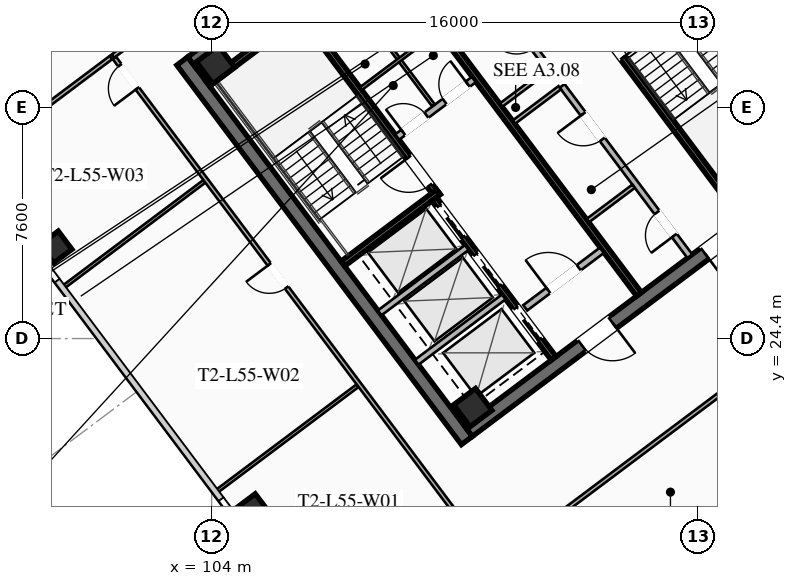
"""IFC4 building model, lengths in metres.
Left out: names, types, materials, properties, quantities, classifications, styles, units other than length and angle.
Written with IfcOpenShell. Run it as: python <this file> out.ifc"""

import sys

from ifc_helpers import new_model, si_unit, direction, frame, frame_2d, origin, origin_2d, place, context, subcontext, project, spatial, rectangle, hollow_rectangle, extrude, element, fill, save


model = new_model("IFC4")
c1 = context("Model", 3, precision=1e-05, world=origin(), true_north=direction((0.0, 1.0)))
c2 = subcontext(c1, "Body", "Model", "MODEL_VIEW")
j1 = project(units=[si_unit("LENGTHUNIT", "METRE"), si_unit("PLANEANGLEUNIT", "RADIAN")], contexts=[c1])
p1 = place(None, origin())
s1 = spatial("IfcSite", under=j1, at=p1, CompositionType="ELEMENT")
p2 = place(p1, origin())
s2 = spatial("IfcBuilding", under=s1, at=p2, CompositionType="ELEMENT")
p3 = place(p2, frame((0.0, 0.0, 204.2)))
s3 = spatial("IfcBuildingStorey", under=s2, at=p3, CompositionType="ELEMENT", Elevation=204.2)
for number, where, z_axis, x_axis in (
    (1, (112.396, 21.047, 0.0), (0.0, 0.0, 1.0), (-0.6, 0.8, 0.0)),
    (2, (115.604, 42.953, 0.0), (0.0, 0.0, 1.0), (0.6, -0.8, 0.0)),
):
    element("IfcWall", number, at=place(p3, frame(where, z_axis=z_axis, x_axis=x_axis)), inside=s3, PredefinedType="SHEAR", context=c2, shape_type="SweptSolid", body=[
        extrude(rectangle(XDim=15.6, YDim=0.45, at=frame_2d((7.8, 0.0))), origin(), (0.0, 0.0, 1.0), 3.55),
    ])
p4 = place(p3, frame((124.649, 30.518, 0.0), z_axis=(0.0, 0.0, 1.0), x_axis=(-0.8, -0.6, 0.0)))
e3 = element("IfcWall", 3, at=p4, inside=s3, PredefinedType="SHEAR", context=c2, shape_type="SweptSolid", body=[
    extrude(rectangle(XDim=15.26, YDim=0.45, at=frame_2d((7.63, 0.0))), origin(), (0.0, 0.0, 1.0), 3.55),
])
p5 = place(p4, frame((9.33, 0.0, 0.0)))
e4 = element("IfcOpeningElement", 4, at=p5, cuts=e3, PredefinedType="OPENING", context=c2, shape_type="SweptSolid", body=[
    extrude(rectangle(XDim=1.25, YDim=2.25, at=frame_2d((0.625, 1.125))), frame((0.0, 0.235, 0.0), z_axis=(0.0, -1.0, 0.0), x_axis=(1.0, 0.0, 0.0)), (0.0, 0.0, 1.0), 0.47),
])
p6 = place(p4, frame((4.28, 0.0, 0.0)))
e5 = element("IfcOpeningElement", 5, at=p6, cuts=e3, PredefinedType="OPENING", context=c2, shape_type="SweptSolid", body=[
    extrude(rectangle(XDim=1.25, YDim=2.25, at=frame_2d((0.625, 1.125))), frame((0.0, 0.235, 0.0), z_axis=(0.0, -1.0, 0.0), x_axis=(1.0, 0.0, 0.0)), (0.0, 0.0, 1.0), 0.47),
])
p7 = place(p3, frame((103.351, 33.482, 0.0), z_axis=(0.0, 0.0, 1.0), x_axis=(0.8, 0.6, 0.0)))
e6 = element("IfcWall", 6, at=p7, inside=s3, PredefinedType="SHEAR", context=c2, shape_type="SweptSolid", body=[
    extrude(rectangle(XDim=15.26, YDim=0.45, at=frame_2d((7.63, 0.0))), origin(), (0.0, 0.0, 1.0), 3.55),
])
p8 = place(p7, frame((4.68, 0.0, 0.0)))
e7 = element("IfcOpeningElement", 7, at=p8, cuts=e6, PredefinedType="OPENING", context=c2, shape_type="SweptSolid", body=[
    extrude(rectangle(XDim=1.25, YDim=2.25, at=frame_2d((0.625, 1.125))), frame((0.0, 0.235, 0.0), z_axis=(0.0, -1.0, 0.0), x_axis=(1.0, 0.0, 0.0)), (0.0, 0.0, 1.0), 0.47),
])
p9 = place(p7, frame((9.73, 0.0, 0.0)))
e8 = element("IfcOpeningElement", 8, at=p9, cuts=e6, PredefinedType="OPENING", context=c2, shape_type="SweptSolid", body=[
    extrude(rectangle(XDim=1.25, YDim=2.25, at=frame_2d((0.625, 1.125))), frame((0.0, 0.235, 0.0), z_axis=(0.0, -1.0, 0.0), x_axis=(1.0, 0.0, 0.0)), (0.0, 0.0, 1.0), 0.47),
])
for number, where, z_axis, x_axis in (
    (9, (112.59, 22.13, 0.0), (0.0, 0.0, 1.0), (0.8, 0.6, 0.0)),
    (10, (104.13, 33.41, 0.0), (0.0, 0.0, 1.0), (0.8, 0.6, 0.0)),
):
    element("IfcColumn", number, at=place(p3, frame(where, z_axis=z_axis, x_axis=x_axis)), inside=s3, PredefinedType="COLUMN", context=c2, shape_type="SweptSolid", body=[
        extrude(hollow_rectangle(XDim=0.9, YDim=0.9, WallThickness=0.04, at=origin_2d()), origin(), (0.0, 0.0, 1.0), 3.37),
    ])
for number, where, z_axis, x_axis in (
    (11, (98.88, 27.41, 0.0), (0.0, 0.0, 1.0), (0.8, 0.6, 0.0)),
    (12, (105.36, 18.77, 0.0), (0.0, 0.0, 1.0), (0.8, 0.6, 0.0)),
):
    element("IfcColumn", number, at=place(p3, frame(where, z_axis=z_axis, x_axis=x_axis)), inside=s3, PredefinedType="COLUMN", context=c2, shape_type="SweptSolid", body=[
        extrude(hollow_rectangle(XDim=0.75, YDim=0.75, WallThickness=0.032, at=origin_2d()), origin(), (0.0, 0.0, 1.0), 3.37),
    ])
p10 = place(p3, frame((111.44, 29.08, 0.0), z_axis=(0.0, 0.0, 1.0), x_axis=(-0.59999041401, 0.800007189403, 0.0)))
e13 = element("IfcWall", 13, at=p10, inside=s3, PredefinedType="SHEAR", context=c2, shape_type="SweptSolid", body=[
    extrude(rectangle(XDim=8.15, YDim=0.2, at=frame_2d((4.075, 0.0))), origin(), (0.0, 0.0, 1.0), 3.37),
])
p11 = place(p10, frame((0.45, 0.0, 0.0)))
e14 = element("IfcOpeningElement", 14, at=p11, cuts=e13, PredefinedType="OPENING", context=c2, shape_type="SweptSolid", body=[
    extrude(rectangle(XDim=1.15, YDim=2.2, at=frame_2d((0.575, 1.1))), frame((0.0, 0.11, 0.0), z_axis=(0.0, -1.0, 0.0), x_axis=(1.0, 0.0, 0.0)), (0.0, 0.0, 1.0), 0.22),
])
for number, where, z_axis, x_axis in (
    (15, (108.316, 26.862, 0.0), (0.0, 0.0, 1.0), (0.8, 0.6, 0.0)),
    (16, (103.876, 32.782, 0.0), (0.0, 0.0, 1.0), (0.8, 0.6, 0.0)),
):
    element("IfcWall", number, at=place(p3, frame(where, z_axis=z_axis, x_axis=x_axis)), inside=s3, PredefinedType="SHEAR", context=c2, shape_type="SweptSolid", body=[
        extrude(rectangle(XDim=3.93, YDim=0.2, at=frame_2d((1.965, 0.0))), origin(), (0.0, 0.0, 1.0), 3.37),
    ])
p12 = place(p3, frame((116.56, 34.92, 0.0), z_axis=(0.0, 0.0, 1.0), x_axis=(0.59999041401, -0.800007189403, 0.0)))
e17 = element("IfcWall", 17, at=p12, inside=s3, PredefinedType="SHEAR", context=c2, shape_type="SweptSolid", body=[
    extrude(rectangle(XDim=8.15, YDim=0.2, at=frame_2d((4.075, 0.0))), origin(), (0.0, 0.0, 1.0), 3.37),
])
p13 = place(p12, frame((0.45, 0.0, 0.0)))
e18 = element("IfcOpeningElement", 18, at=p13, cuts=e17, PredefinedType="OPENING", context=c2, shape_type="SweptSolid", body=[
    extrude(rectangle(XDim=1.15, YDim=2.2, at=frame_2d((0.575, 1.1))), frame((0.0, 0.11, 0.0), z_axis=(0.0, -1.0, 0.0), x_axis=(1.0, 0.0, 0.0)), (0.0, 0.0, 1.0), 0.22),
])
p14 = place(p3, frame((118.058, 25.856, 0.0), z_axis=(0.0, 0.0, 1.0), x_axis=(-0.600002657301, 0.799998007018, 0.0)))
e19 = element("IfcWall", 19, at=p14, inside=s3, PredefinedType="SHEAR", context=c2, shape_type="SweptSolid", body=[
    extrude(rectangle(XDim=14.7, YDim=0.2, at=frame_2d((7.35, 0.0))), origin(), (0.0, 0.0, 1.0), 3.37),
])
p15 = place(p3, frame((110.104, 31.028, 0.0), z_axis=(0.0, 0.0, 1.0), x_axis=(0.800018601094, 0.59997519774, 0.0)))
e20 = element("IfcWall", 20, at=p15, inside=s3, PredefinedType="SOLIDWALL", context=c2, shape_type="SweptSolid", body=[
    extrude(rectangle(XDim=3.15, YDim=0.22, at=frame_2d((1.575, 0.0))), origin(), (0.0, 0.0, 1.0), 2.723),
])
p16 = place(p15, frame((0.25, 0.0, 0.0)))
e21 = element("IfcOpeningElement", 21, at=p16, cuts=e20, PredefinedType="OPENING", context=c2, shape_type="SweptSolid", body=[
    extrude(rectangle(XDim=0.95, YDim=2.05, at=frame_2d((0.475, 1.025))), frame((0.0, 0.12, 0.0), z_axis=(0.0, -1.0, 0.0), x_axis=(1.0, 0.0, 0.0)), (0.0, 0.0, 1.0), 0.24),
])
p17 = place(p15, frame((1.95, 0.0, 0.0)))
e22 = element("IfcOpeningElement", 22, at=p17, cuts=e20, PredefinedType="OPENING", context=c2, shape_type="SweptSolid", body=[
    extrude(rectangle(XDim=0.95, YDim=2.05, at=frame_2d((0.475, 1.025))), frame((0.0, 0.12, 0.0), z_axis=(0.0, -1.0, 0.0), x_axis=(1.0, 0.0, 0.0)), (0.0, 0.0, 1.0), 0.24),
])
p18 = place(p3, frame((114.316, 25.412, 0.0), z_axis=(0.0, 0.0, 1.0), x_axis=(0.800018601094, 0.59997519774, 0.0)))
e23 = element("IfcWall", 23, at=p18, inside=s3, PredefinedType="SOLIDWALL", context=c2, shape_type="SweptSolid", body=[
    extrude(rectangle(XDim=3.15, YDim=0.22, at=frame_2d((1.575, 0.0))), origin(), (0.0, 0.0, 1.0), 2.723),
])
p19 = place(p18, frame((0.95, 0.0, 0.0)))
e24 = element("IfcOpeningElement", 24, at=p19, cuts=e23, PredefinedType="OPENING", context=c2, shape_type="SweptSolid", body=[
    extrude(rectangle(XDim=1.25, YDim=2.25, at=frame_2d((0.625, 1.125))), frame((0.0, 0.12, 0.0), z_axis=(0.0, -1.0, 0.0), x_axis=(1.0, 0.0, 0.0)), (0.0, 0.0, 1.0), 0.24),
])
p20 = place(p3, frame((115.25, 23.75, 0.0), z_axis=(0.0, 0.0, 1.0), x_axis=(-0.599994036198, 0.800004472816, 0.0)))
e25 = element("IfcWall", 25, at=p20, inside=s3, PredefinedType="SHEAR", context=c2, shape_type="SweptSolid", body=[
    extrude(rectangle(XDim=6.55, YDim=0.2, at=frame_2d((3.275, 0.0))), origin(), (0.0, 0.0, 1.0), 3.37),
])
p21 = place(p20, frame((4.975, 0.0, 0.0)))
e26 = element("IfcOpeningElement", 26, at=p21, cuts=e25, PredefinedType="OPENING", context=c2, shape_type="SweptSolid", body=[
    extrude(rectangle(XDim=1.3, YDim=2.25, at=frame_2d((0.65, 1.125))), frame((0.0, 0.11, 0.0), z_axis=(0.0, -1.0, 0.0), x_axis=(1.0, 0.0, 0.0)), (0.0, 0.0, 1.0), 0.22),
])
p22 = place(p20, frame((2.975, 0.0, 0.0)))
e27 = element("IfcOpeningElement", 27, at=p22, cuts=e25, PredefinedType="OPENING", context=c2, shape_type="SweptSolid", body=[
    extrude(rectangle(XDim=1.3, YDim=2.25, at=frame_2d((0.65, 1.125))), frame((0.0, 0.11, 0.0), z_axis=(0.0, -1.0, 0.0), x_axis=(1.0, 0.0, 0.0)), (0.0, 0.0, 1.0), 0.22),
])
p23 = place(p20, frame((0.775, 0.0, 0.0)))
e28 = element("IfcOpeningElement", 28, at=p23, cuts=e25, PredefinedType="OPENING", context=c2, shape_type="SweptSolid", body=[
    extrude(rectangle(XDim=1.3, YDim=2.25, at=frame_2d((0.65, 1.125))), frame((0.0, 0.11, 0.0), z_axis=(0.0, -1.0, 0.0), x_axis=(1.0, 0.0, 0.0)), (0.0, 0.0, 1.0), 0.22),
])
for number, where, z_axis, x_axis in (
    (29, (110.746, 23.622, 0.0), (0.0, 0.0, 1.0), (0.8, 0.6, 0.0)),
    (30, (109.528, 25.246, 0.0), (0.0, 0.0, 1.0), (0.8, 0.6, 0.0)),
):
    element("IfcWall", number, at=place(p3, frame(where, z_axis=z_axis, x_axis=x_axis)), inside=s3, PredefinedType="SOLIDWALL", context=c2, shape_type="SweptSolid", body=[
        extrude(rectangle(XDim=3.58, YDim=0.2, at=frame_2d((1.79, 0.0))), origin(), (0.0, 0.0, 1.0), 3.37),
    ])
p24 = place(p3, frame((111.296, 32.072, 0.0), z_axis=(0.0, 0.0, 1.0), x_axis=(-0.59995887973, 0.800030838552, 0.0)))
e31 = element("IfcWall", 31, at=p24, inside=s3, PredefinedType="PARTITIONING", context=c2, shape_type="SweptSolid", body=[
    extrude(rectangle(XDim=3.8, YDim=0.11, at=frame_2d((1.9, 0.0))), origin(), (0.0, 0.0, 1.0), 2.723),
])
p25 = place(p3, frame((108.91, 32.62, 0.0), z_axis=(0.0, 0.0, 1.0), x_axis=(0.800018601094, 0.59997519774, 0.0)))
e32 = element("IfcWall", 32, at=p25, inside=s3, PredefinedType="PARTITIONING", context=c2, shape_type="SweptSolid", body=[
    extrude(rectangle(XDim=3.15, YDim=0.11, at=frame_2d((1.575, 0.0))), origin(), (0.0, 0.0, 1.0), 2.723),
])
p26 = place(p3, frame((119.73, 27.11, 0.0), z_axis=(0.0, 0.0, 1.0), x_axis=(-0.600005580459, 0.799995814625, 0.0)))
e33 = element("IfcWall", 33, at=p26, inside=s3, PredefinedType="SOLIDWALL", context=c2, shape_type="SweptSolid", body=[
    extrude(rectangle(XDim=7.0, YDim=0.2, at=frame_2d((3.5, 0.0))), origin(), (0.0, 0.0, 1.0), 2.723),
])
p27 = place(p26, frame((0.85, 0.0, 0.0)))
e34 = element("IfcOpeningElement", 34, at=p27, cuts=e33, PredefinedType="OPENING", context=c2, shape_type="SweptSolid", body=[
    extrude(rectangle(XDim=0.95, YDim=2.05, at=frame_2d((0.475, 1.025))), frame((0.0, 0.11, 0.0), z_axis=(0.0, -1.0, 0.0), x_axis=(1.0, 0.0, 0.0)), (0.0, 0.0, 1.0), 0.22),
])
p28 = place(p26, frame((4.8, 0.0, 0.0)))
e35 = element("IfcOpeningElement", 35, at=p28, cuts=e33, PredefinedType="OPENING", context=c2, shape_type="SweptSolid", body=[
    extrude(rectangle(XDim=1.05, YDim=2.2, at=frame_2d((0.525, 1.1))), frame((0.0, 0.11, 0.0), z_axis=(0.0, -1.0, 0.0), x_axis=(1.0, 0.0, 0.0)), (0.0, 0.0, 1.0), 0.22),
])
for number, where, z_axis, x_axis in (
    (36, (113.946, 31.522, 0.0), (0.0, 0.0, 1.0), (0.8, 0.6, 0.0)),
    (37, (116.376, 28.282, 0.0), (0.0, 0.0, 1.0), (0.8, 0.6, 0.0)),
):
    element("IfcWall", number, at=place(p3, frame(where, z_axis=z_axis, x_axis=x_axis)), inside=s3, PredefinedType="PARTITIONING", context=c2, shape_type="SweptSolid", body=[
        extrude(rectangle(XDim=1.88, YDim=0.135, at=frame_2d((0.94, 0.0))), origin(), (0.0, 0.0, 1.0), 2.723),
    ])
p29 = place(p3, frame((115.11, 33.27, 0.0), z_axis=(0.0, 0.0, 1.0), x_axis=(-0.600011160345, 0.79999162962, 0.0)))
e38 = element("IfcWall", 38, at=p29, inside=s3, PredefinedType="SOLIDWALL", context=c2, shape_type="SweptSolid", body=[
    extrude(rectangle(XDim=7.0, YDim=0.2, at=frame_2d((3.5, 0.0))), origin(), (0.0, 0.0, 1.0), 2.723),
])
p30 = place(p29, frame((0.85, 0.0, 0.0)))
e39 = element("IfcOpeningElement", 39, at=p30, cuts=e38, PredefinedType="OPENING", context=c2, shape_type="SweptSolid", body=[
    extrude(rectangle(XDim=0.95, YDim=2.05, at=frame_2d((0.475, 1.025))), frame((0.0, 0.11, 0.0), z_axis=(0.0, -1.0, 0.0), x_axis=(1.0, 0.0, 0.0)), (0.0, 0.0, 1.0), 0.22),
])
p31 = place(p29, frame((4.85, 0.0, 0.0)))
e40 = element("IfcOpeningElement", 40, at=p31, cuts=e38, PredefinedType="OPENING", context=c2, shape_type="SweptSolid", body=[
    extrude(rectangle(XDim=0.95, YDim=2.05, at=frame_2d((0.475, 1.025))), frame((0.0, 0.11, 0.0), z_axis=(0.0, -1.0, 0.0), x_axis=(1.0, 0.0, 0.0)), (0.0, 0.0, 1.0), 0.22),
])
p32 = place(p3, frame((113.526, 32.082, 0.0), z_axis=(0.0, 0.0, 1.0), x_axis=(0.800046745961, 0.599937666993, 0.0)))
e41 = element("IfcWall", 41, at=p32, inside=s3, PredefinedType="PARTITIONING", context=c2, shape_type="SweptSolid", body=[
    extrude(rectangle(XDim=1.88, YDim=0.135, at=frame_2d((0.94, 0.0))), origin(), (0.0, 0.0, 1.0), 2.723),
])
p33 = place(p3, frame((100.756, 33.692, 0.0), z_axis=(0.0, 0.0, 1.0), x_axis=(0.799998716732, 0.60000171102, 0.0)))
e42 = element("IfcWall", 42, at=p33, inside=s3, PredefinedType="PARTITIONING", context=c2, shape_type="SweptSolid", body=[
    extrude(rectangle(XDim=22.83, YDim=0.135, at=frame_2d((11.415, 0.0))), origin(), (0.0, 0.0, 1.0), 2.723),
])
p34 = place(p33, frame((9.38, 0.0, 0.0)))
e43 = element("IfcOpeningElement", 43, at=p34, cuts=e42, PredefinedType="OPENING", context=c2, shape_type="SweptSolid", body=[
    extrude(rectangle(XDim=0.95, YDim=2.05, at=frame_2d((0.475, 1.025))), frame((0.0, 0.077, 0.0), z_axis=(0.0, -1.0, 0.0), x_axis=(1.0, 0.0, 0.0)), (0.0, 0.0, 1.0), 0.155),
])
p35 = place(p33, frame((21.58, 0.0, 0.0)))
e44 = element("IfcOpeningElement", 44, at=p35, cuts=e42, PredefinedType="OPENING", context=c2, shape_type="SweptSolid", body=[
    extrude(rectangle(XDim=0.95, YDim=2.05, at=frame_2d((0.475, 1.025))), frame((0.0, 0.077, 0.0), z_axis=(0.0, -1.0, 0.0), x_axis=(1.0, 0.0, 0.0)), (0.0, 0.0, 1.0), 0.155),
])
p36 = place(p3, frame((124.462, 25.384, 0.0), z_axis=(0.0, 0.0, 1.0), x_axis=(-0.799997904343, -0.6000027942, 0.0)))
e45 = element("IfcWall", 45, at=p36, inside=s3, PredefinedType="PARTITIONING", context=c2, shape_type="SweptSolid", body=[
    extrude(rectangle(XDim=13.98, YDim=0.135, at=frame_2d((6.99, 0.0))), origin(), (0.0, 0.0, 1.0), 2.723),
])
p37 = place(p36, frame((3.635, 0.0, 0.0)))
e46 = element("IfcOpeningElement", 46, at=p37, cuts=e45, PredefinedType="OPENING", context=c2, shape_type="SweptSolid", body=[
    extrude(rectangle(XDim=0.95, YDim=2.05, at=frame_2d((0.475, 1.025))), frame((0.0, 0.077, 0.0), z_axis=(0.0, -1.0, 0.0), x_axis=(1.0, 0.0, 0.0)), (0.0, 0.0, 1.0), 0.155),
])
p38 = place(p3, frame((113.23, 17.06, 0.0), z_axis=(0.0, 0.0, 1.0), x_axis=(-0.600003772342, 0.79999717073, 0.0)))
e47 = element("IfcWall", 47, at=p38, inside=s3, PredefinedType="PARTITIONING", context=c2, shape_type="SweptSolid", body=[
    extrude(rectangle(XDim=20.71, YDim=0.135, at=frame_2d((10.355, 0.0))), origin(), (0.0, 0.0, 1.0), 2.723),
])
p39 = place(p38, frame((0.3, 0.0, 0.0)))
e48 = element("IfcOpeningElement", 48, at=p39, cuts=e47, PredefinedType="OPENING", context=c2, shape_type="SweptSolid", body=[
    extrude(rectangle(XDim=0.95, YDim=2.05, at=frame_2d((0.475, 1.025))), frame((0.0, 0.077, 0.0), z_axis=(0.0, -1.0, 0.0), x_axis=(1.0, 0.0, 0.0)), (0.0, 0.0, 1.0), 0.155),
])
p40 = place(p38, frame((11.272, 0.0, 0.0)))
e49 = element("IfcOpeningElement", 49, at=p40, cuts=e47, PredefinedType="OPENING", context=c2, shape_type="SweptSolid", body=[
    extrude(rectangle(XDim=0.95, YDim=2.05, at=frame_2d((0.475, 1.025))), frame((0.0, 0.077, 0.0), z_axis=(0.0, -1.0, 0.0), x_axis=(1.0, 0.0, 0.0)), (0.0, 0.0, 1.0), 0.155),
])
p41 = place(p38, frame((19.46, 0.0, 0.0)))
e50 = element("IfcOpeningElement", 50, at=p41, cuts=e47, PredefinedType="OPENING", context=c2, shape_type="SweptSolid", body=[
    extrude(rectangle(XDim=0.95, YDim=2.05, at=frame_2d((0.475, 1.025))), frame((0.0, 0.077, 0.0), z_axis=(0.0, -1.0, 0.0), x_axis=(1.0, 0.0, 0.0)), (0.0, 0.0, 1.0), 0.155),
])
p42 = place(p3, frame((100.692, 33.644, 0.0), z_axis=(0.0, 0.0, 1.0), x_axis=(-0.800005033825, -0.599993288175, 0.0)))
e51 = element("IfcWall", 51, at=p42, inside=s3, PredefinedType="PARTITIONING", context=c2, shape_type="SweptSolid", body=[
    extrude(rectangle(XDim=5.82, YDim=0.135, at=frame_2d((2.91, 0.0))), origin(), (0.0, 0.0, 1.0), 2.723),
])
for number, where, z_axis, x_axis in (
    (52, (104.136, 19.352, 0.0), (0.0, 0.0, 1.0), (0.8, 0.6, 0.0)),
    (53, (99.096, 26.072, 0.0), (0.0, 0.0, 1.0), (0.8, 0.6, 0.0)),
):
    element("IfcWall", number, at=place(p3, frame(where, z_axis=z_axis, x_axis=x_axis)), inside=s3, PredefinedType="PARTITIONING", context=c2, shape_type="SweptSolid", body=[
        extrude(rectangle(XDim=5.82, YDim=0.11, at=frame_2d((2.91, 0.0))), origin(), (0.0, 0.0, 1.0), 2.723),
    ])
p43 = place(p5, origin())
e54 = element("IfcDoor", 54, at=p43, inside=s3, OperationType="SINGLE_SWING_LEFT", PredefinedType="DOOR", context=c2, shape_type="SweptSolid", body=[
    extrude(rectangle(XDim=1.25, YDim=2.25, at=frame_2d((0.625, 1.125))), frame((0.0, 0.025, 0.0), z_axis=(0.0, -1.0, 0.0), x_axis=(1.0, 0.0, 0.0)), (0.0, 0.0, 1.0), 0.05),
])
fill(e4, e54)
p44 = place(p6, origin())
e55 = element("IfcDoor", 55, at=p44, inside=s3, OperationType="SINGLE_SWING_RIGHT", PredefinedType="DOOR", context=c2, shape_type="SweptSolid", body=[
    extrude(rectangle(XDim=1.25, YDim=2.25, at=frame_2d((0.625, 1.125))), frame((0.0, 0.025, 0.0), z_axis=(0.0, -1.0, 0.0), x_axis=(1.0, 0.0, 0.0)), (0.0, 0.0, 1.0), 0.05),
])
fill(e5, e55)
p45 = place(p11, origin())
e56 = element("IfcDoor", 56, at=p45, inside=s3, OperationType="SINGLE_SWING_RIGHT", PredefinedType="DOOR", context=c2, shape_type="SweptSolid", body=[
    extrude(rectangle(XDim=1.15, YDim=2.2, at=frame_2d((0.575, 1.1))), frame((0.0, 0.025, 0.0), z_axis=(0.0, -1.0, 0.0), x_axis=(1.0, 0.0, 0.0)), (0.0, 0.0, 1.0), 0.05),
])
fill(e14, e56)
p46 = place(p13, origin())
e57 = element("IfcDoor", 57, at=p46, inside=s3, OperationType="SINGLE_SWING_RIGHT", PredefinedType="DOOR", context=c2, shape_type="SweptSolid", body=[
    extrude(rectangle(XDim=1.15, YDim=2.2, at=frame_2d((0.575, 1.1))), frame((0.0, 0.025, 0.0), z_axis=(0.0, -1.0, 0.0), x_axis=(1.0, 0.0, 0.0)), (0.0, 0.0, 1.0), 0.05),
])
fill(e18, e57)
p47 = place(p19, origin())
e58 = element("IfcDoor", 58, at=p47, inside=s3, OperationType="SINGLE_SWING_LEFT", PredefinedType="DOOR", context=c2, shape_type="SweptSolid", body=[
    extrude(rectangle(XDim=1.25, YDim=2.25, at=frame_2d((0.625, 1.125))), frame((0.0, 0.025, 0.0), z_axis=(0.0, -1.0, 0.0), x_axis=(1.0, 0.0, 0.0)), (0.0, 0.0, 1.0), 0.05),
])
fill(e24, e58)
p48 = place(p16, origin())
e59 = element("IfcDoor", 59, at=p48, inside=s3, OperationType="SINGLE_SWING_LEFT", PredefinedType="DOOR", context=c2, shape_type="SweptSolid", body=[
    extrude(rectangle(XDim=0.95, YDim=2.05, at=frame_2d((0.475, 1.025))), frame((0.0, 0.025, 0.0), z_axis=(0.0, -1.0, 0.0), x_axis=(1.0, 0.0, 0.0)), (0.0, 0.0, 1.0), 0.05),
])
fill(e21, e59)
p49 = place(p17, origin())
e60 = element("IfcDoor", 60, at=p49, inside=s3, OperationType="SINGLE_SWING_RIGHT", PredefinedType="DOOR", context=c2, shape_type="SweptSolid", body=[
    extrude(rectangle(XDim=0.95, YDim=2.05, at=frame_2d((0.475, 1.025))), frame((0.0, 0.025, 0.0), z_axis=(0.0, -1.0, 0.0), x_axis=(1.0, 0.0, 0.0)), (0.0, 0.0, 1.0), 0.05),
])
fill(e22, e60)
p50 = place(p27, origin())
e61 = element("IfcDoor", 61, at=p50, inside=s3, OperationType="SINGLE_SWING_LEFT", PredefinedType="DOOR", context=c2, shape_type="SweptSolid", body=[
    extrude(rectangle(XDim=0.95, YDim=2.05, at=frame_2d((0.475, 1.025))), frame((0.0, 0.025, 0.0), z_axis=(0.0, -1.0, 0.0), x_axis=(1.0, 0.0, 0.0)), (0.0, 0.0, 1.0), 0.05),
])
fill(e34, e61)
p51 = place(p28, origin())
e62 = element("IfcDoor", 62, at=p51, inside=s3, OperationType="SINGLE_SWING_RIGHT", PredefinedType="DOOR", context=c2, shape_type="SweptSolid", body=[
    extrude(rectangle(XDim=1.05, YDim=2.2, at=frame_2d((0.525, 1.1))), frame((0.0, 0.025, 0.0), z_axis=(0.0, -1.0, 0.0), x_axis=(1.0, 0.0, 0.0)), (0.0, 0.0, 1.0), 0.05),
])
fill(e35, e62)
p52 = place(p40, origin())
e63 = element("IfcDoor", 63, at=p52, inside=s3, OperationType="SINGLE_SWING_RIGHT", PredefinedType="DOOR", context=c2, shape_type="SweptSolid", body=[
    extrude(rectangle(XDim=0.95, YDim=2.05, at=frame_2d((0.475, 1.025))), frame((0.0, 0.025, 0.0), z_axis=(0.0, -1.0, 0.0), x_axis=(1.0, 0.0, 0.0)), (0.0, 0.0, 1.0), 0.05),
])
fill(e49, e63)
p53 = place(p41, origin())
e64 = element("IfcDoor", 64, at=p53, inside=s3, OperationType="SINGLE_SWING_LEFT", PredefinedType="DOOR", context=c2, shape_type="SweptSolid", body=[
    extrude(rectangle(XDim=0.95, YDim=2.05, at=frame_2d((0.475, 1.025))), frame((0.0, 0.025, 0.0), z_axis=(0.0, -1.0, 0.0), x_axis=(1.0, 0.0, 0.0)), (0.0, 0.0, 1.0), 0.05),
])
fill(e50, e64)
p54 = place(p21, origin())
e65 = element("IfcDoor", 65, at=p54, inside=s3, OperationType="SLIDING_TO_LEFT", PredefinedType="DOOR", context=c2, shape_type="SweptSolid", body=[
    extrude(rectangle(XDim=1.3, YDim=2.25, at=frame_2d((0.65, 1.125))), frame((0.0, 0.025, 0.0), z_axis=(0.0, -1.0, 0.0), x_axis=(1.0, 0.0, 0.0)), (0.0, 0.0, 1.0), 0.05),
])
fill(e26, e65)
p55 = place(p22, origin())
e66 = element("IfcDoor", 66, at=p55, inside=s3, OperationType="SLIDING_TO_LEFT", PredefinedType="DOOR", context=c2, shape_type="SweptSolid", body=[
    extrude(rectangle(XDim=1.3, YDim=2.25, at=frame_2d((0.65, 1.125))), frame((0.0, 0.025, 0.0), z_axis=(0.0, -1.0, 0.0), x_axis=(1.0, 0.0, 0.0)), (0.0, 0.0, 1.0), 0.05),
])
fill(e27, e66)
p56 = place(p23, origin())
e67 = element("IfcDoor", 67, at=p56, inside=s3, OperationType="SLIDING_TO_LEFT", PredefinedType="DOOR", context=c2, shape_type="SweptSolid", body=[
    extrude(rectangle(XDim=1.3, YDim=2.25, at=frame_2d((0.65, 1.125))), frame((0.0, 0.025, 0.0), z_axis=(0.0, -1.0, 0.0), x_axis=(1.0, 0.0, 0.0)), (0.0, 0.0, 1.0), 0.05),
])
fill(e28, e67)
save(model, sys.argv[1])
